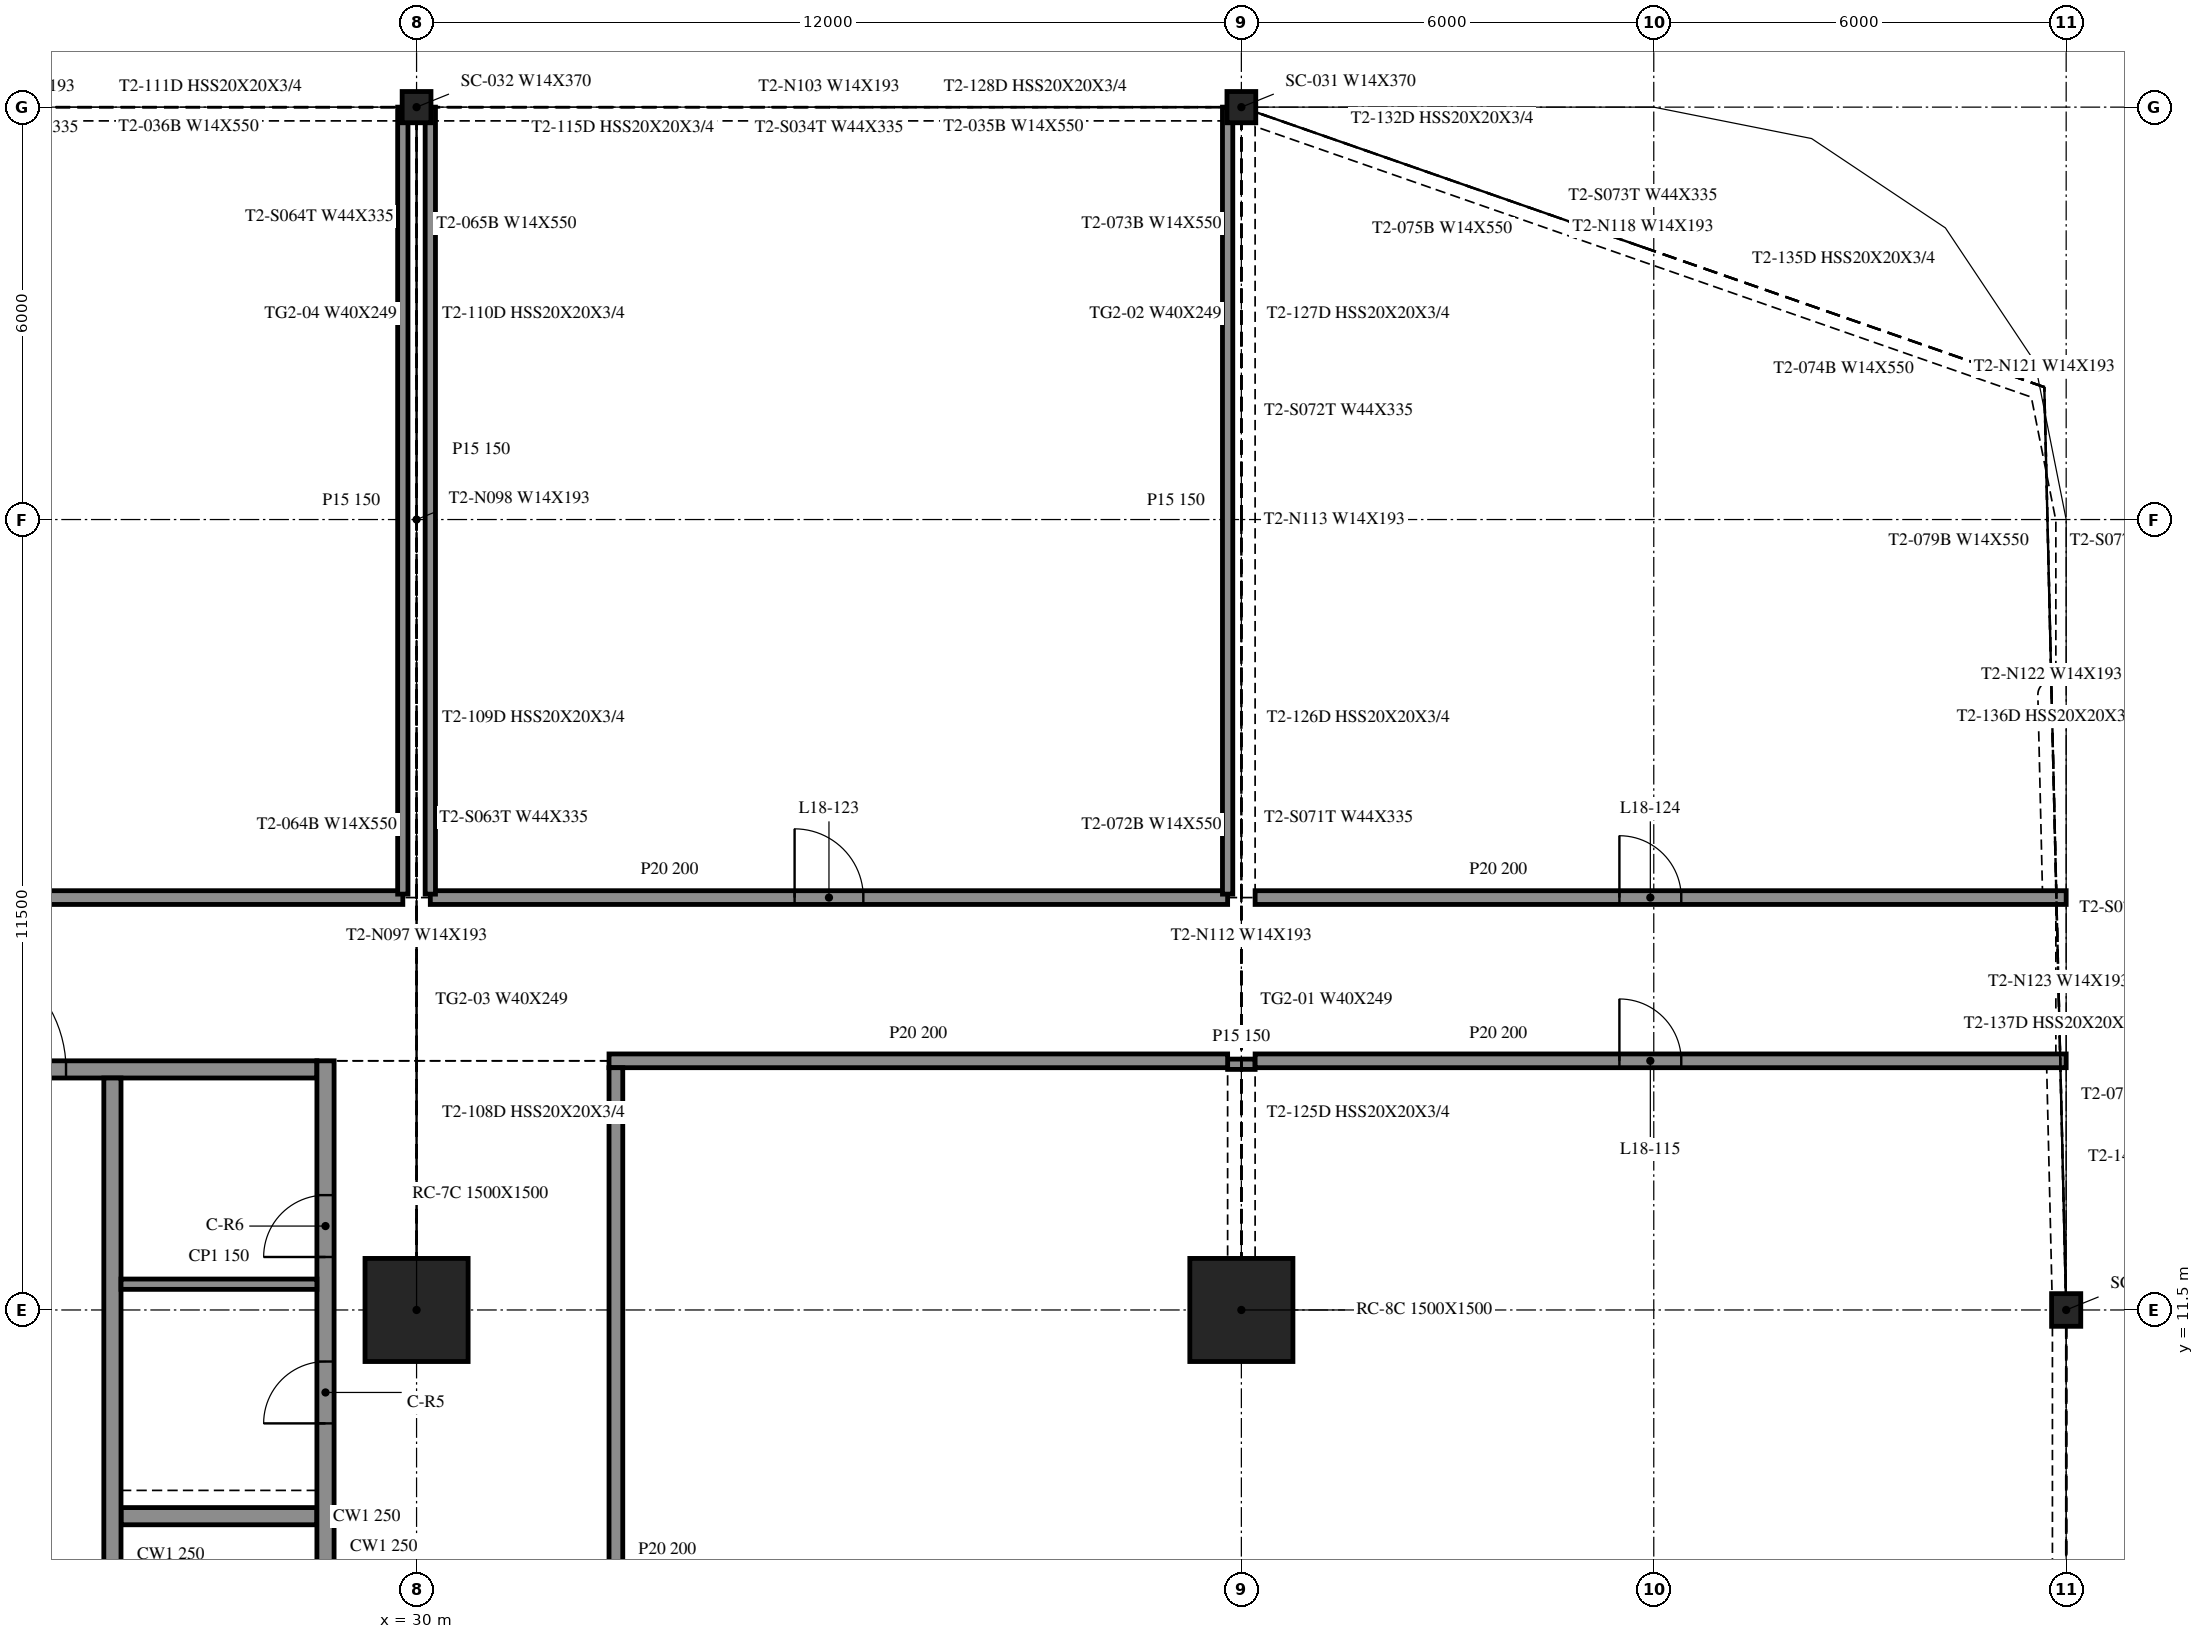
"""IFC4 building model, lengths in metres.
Left out: names, types, materials, properties, quantities, classifications, styles, units other than length and angle.
Written with IfcOpenShell. Run it as: python <this file> out.ifc"""

import sys

from ifc_helpers import new_model, si_unit, direction, frame, frame_2d, origin, origin_2d, place, context, subcontext, project, spatial, rectangle, i_section, extrude, element, fill, save


model = new_model("IFC4")
c1 = context("Model", 3, precision=1e-05, world=origin(), true_north=direction((0.0, 1.0)))
c2 = subcontext(c1, "Body", "Model", "MODEL_VIEW")
j1 = project(units=[si_unit("LENGTHUNIT", "METRE"), si_unit("PLANEANGLEUNIT", "RADIAN")], contexts=[c1])
p1 = place(None, origin())
s1 = spatial("IfcSite", under=j1, at=p1, CompositionType="ELEMENT")
p2 = place(p1, origin())
s2 = spatial("IfcBuilding", under=s1, at=p2, CompositionType="ELEMENT")
p3 = place(p2, frame((0.0, 0.0, 80.4)))
s3 = spatial("IfcBuildingStorey", under=s2, at=p3, CompositionType="ELEMENT", Elevation=80.4)
for number, where, z_axis, x_axis in (
    (1, (30.0, 11.5, -0.55), (0.0, 0.0, 1.0), (1.0, 0.0, 0.0)),
    (2, (42.0, 11.5, -0.55), (0.0, 0.0, 1.0), (1.0, 0.0, 0.0)),
):
    element("IfcColumn", number, at=place(p3, frame(where, z_axis=z_axis, x_axis=x_axis)), inside=s3, PredefinedType="COLUMN", context=c2, shape_type="SweptSolid", body=[
        extrude(rectangle(XDim=1.5, YDim=1.5, at=origin_2d()), origin(), (0.0, 0.0, 1.0), 4.61),
    ])
p4 = place(p3, frame((54.0, 11.5, -0.55), z_axis=(0.0, 0.0, 1.0), x_axis=(1.0, 0.0, 0.0)))
e3 = element("IfcColumn", 3, at=p4, inside=s3, PredefinedType="COLUMN", context=c2, shape_type="SweptSolid", body=[
    extrude(i_section(OverallWidth=0.424, OverallDepth=0.475, WebThickness=0.048, FlangeThickness=0.077, at=origin_2d()), origin(), (0.0, 0.0, 1.0), 4.61),
])
for number, where, z_axis, x_axis in (
    (4, (42.0, 29.0, -0.55), (0.0, 0.0, 1.0), (1.0, 0.0, 0.0)),
    (5, (30.0, 29.0, -0.55), (0.0, 0.0, 1.0), (1.0, 0.0, 0.0)),
):
    element("IfcColumn", number, at=place(p3, frame(where, z_axis=z_axis, x_axis=x_axis)), inside=s3, PredefinedType="COLUMN", context=c2, shape_type="SweptSolid", body=[
        extrude(i_section(OverallWidth=0.419, OverallDepth=0.455, WebThickness=0.042, FlangeThickness=0.068, at=origin_2d()), origin(), (0.0, 0.0, 1.0), 4.61),
    ])
p5 = place(p3, frame((28.675, -9.125, 0.0), z_axis=(0.0, 0.0, 1.0), x_axis=(0.0, 1.0, 0.0)))
e6 = element("IfcWall", 6, at=p5, inside=s3, PredefinedType="SOLIDWALL", context=c2, shape_type="SweptSolid", body=[
    extrude(rectangle(XDim=24.25, YDim=0.25, at=frame_2d((12.125, 0.0))), origin(), (0.0, 0.0, 1.0), 4.06),
])
p6 = place(p5, frame((14.425, 0.0, 0.0)))
e7 = element("IfcOpeningElement", 7, at=p6, cuts=e6, PredefinedType="OPENING", context=c2, shape_type="SweptSolid", body=[
    extrude(rectangle(XDim=0.9, YDim=2.1, at=frame_2d((0.45, 1.05))), frame((0.0, 0.135, 0.0), z_axis=(0.0, -1.0, 0.0), x_axis=(1.0, 0.0, 0.0)), (0.0, 0.0, 1.0), 0.27),
])
p7 = place(p5, frame((18.975, 0.0, 0.0)))
e8 = element("IfcOpeningElement", 8, at=p7, cuts=e6, PredefinedType="OPENING", context=c2, shape_type="SweptSolid", body=[
    extrude(rectangle(XDim=0.9, YDim=2.1, at=frame_2d((0.45, 1.05))), frame((0.0, 0.135, 0.0), z_axis=(0.0, -1.0, 0.0), x_axis=(1.0, 0.0, 0.0)), (0.0, 0.0, 1.0), 0.27),
])
p8 = place(p5, frame((21.396, 0.0, 0.0)))
e9 = element("IfcOpeningElement", 9, at=p8, cuts=e6, PredefinedType="OPENING", context=c2, shape_type="SweptSolid", body=[
    extrude(rectangle(XDim=0.9, YDim=2.1, at=frame_2d((0.45, 1.05))), frame((0.0, 0.135, 0.0), z_axis=(0.0, -1.0, 0.0), x_axis=(1.0, 0.0, 0.0)), (0.0, 0.0, 1.0), 0.27),
])
p9 = place(p3, frame((19.45, 15.0, 0.0), z_axis=(0.0, 0.0, 1.0), x_axis=(1.0, 0.0, 0.0)))
e10 = element("IfcWall", 10, at=p9, inside=s3, PredefinedType="SOLIDWALL", context=c2, shape_type="SweptSolid", body=[
    extrude(rectangle(XDim=9.1, YDim=0.25, at=frame_2d((4.55, 0.0))), origin(), (0.0, 0.0, 1.0), 4.06),
])
p10 = place(p9, frame((3.65, 0.0, 0.0)))
e11 = element("IfcOpeningElement", 11, at=p10, cuts=e10, PredefinedType="OPENING", context=c2, shape_type="SweptSolid", body=[
    extrude(rectangle(XDim=1.8, YDim=2.1, at=frame_2d((0.9, 1.05))), frame((0.0, 0.135, 0.0), z_axis=(0.0, -1.0, 0.0), x_axis=(1.0, 0.0, 0.0)), (0.0, 0.0, 1.0), 0.27),
])
p11 = place(p3, frame((25.575, 14.875, 0.0), z_axis=(0.0, 0.0, 1.0), x_axis=(0.0, -1.0, 0.0)))
e12 = element("IfcWall", 12, at=p11, inside=s3, PredefinedType="SOLIDWALL", context=c2, shape_type="SweptSolid", body=[
    extrude(rectangle(XDim=17.5, YDim=0.25, at=frame_2d((8.75, 0.0))), origin(), (0.0, 0.0, 1.0), 4.06),
])
p12 = place(p11, frame((15.45, 0.0, 0.0)))
e13 = element("IfcOpeningElement", 13, at=p12, cuts=e12, PredefinedType="OPENING", context=c2, shape_type="SweptSolid", body=[
    extrude(rectangle(XDim=1.1, YDim=2.1, at=frame_2d((0.55, 1.05))), frame((0.0, 0.135, 0.0), z_axis=(0.0, -1.0, 0.0), x_axis=(1.0, 0.0, 0.0)), (0.0, 0.0, 1.0), 0.27),
])
p13 = place(p11, frame((12.8, 0.0, 0.0)))
e14 = element("IfcOpeningElement", 14, at=p13, cuts=e12, PredefinedType="OPENING", context=c2, shape_type="SweptSolid", body=[
    extrude(rectangle(XDim=0.9, YDim=2.1, at=frame_2d((0.45, 1.05))), frame((0.0, 0.135, 0.0), z_axis=(0.0, -1.0, 0.0), x_axis=(1.0, 0.0, 0.0)), (0.0, 0.0, 1.0), 0.27),
])
p14 = place(p3, frame((25.7, 8.5, 0.0), z_axis=(0.0, 0.0, 1.0), x_axis=(1.0, 0.0, 0.0)))
e15 = element("IfcWall", 15, at=p14, inside=s3, PredefinedType="SOLIDWALL", context=c2, shape_type="SweptSolid", body=[
    extrude(rectangle(XDim=2.85, YDim=0.25, at=frame_2d((1.425, 0.0))), origin(), (0.0, 0.0, 1.0), 4.06),
])
p15 = place(p3, frame((25.7, 11.875, 0.0), z_axis=(0.0, 0.0, 1.0), x_axis=(1.0, 0.0, 0.0)))
e16 = element("IfcWall", 16, at=p15, inside=s3, PredefinedType="PARTITIONING", context=c2, shape_type="SweptSolid", body=[
    extrude(rectangle(XDim=2.85, YDim=0.15, at=frame_2d((1.425, 0.0))), origin(), (0.0, 0.0, 1.0), 4.06),
])
p16 = place(p3, frame((41.8, 15.075, 0.0), z_axis=(0.0, 0.0, 1.0), x_axis=(1.0, 0.0, 0.0)))
e17 = element("IfcWall", 17, at=p16, inside=s3, PredefinedType="PARTITIONING", context=c2, shape_type="SweptSolid", body=[
    extrude(rectangle(XDim=0.4, YDim=0.15, at=frame_2d((0.2, 0.0))), origin(), (0.0, 0.0, 1.0), 4.06),
])
p17 = place(p3, frame((32.8, 15.125, 0.0), z_axis=(0.0, 0.0, 1.0), x_axis=(1.0, 0.0, 0.0)))
e18 = element("IfcWall", 18, at=p17, inside=s3, PredefinedType="PARTITIONING", context=c2, shape_type="SweptSolid", body=[
    extrude(rectangle(XDim=9.0, YDim=0.2, at=frame_2d((4.5, 0.0))), origin(), (0.0, 0.0, 1.0), 4.06),
])
p18 = place(p3, frame((42.2, 15.125, 0.0), z_axis=(0.0, 0.0, 1.0), x_axis=(1.0, 0.0, 0.0)))
e19 = element("IfcWall", 19, at=p18, inside=s3, PredefinedType="PARTITIONING", context=c2, shape_type="SweptSolid", body=[
    extrude(rectangle(XDim=11.8, YDim=0.2, at=frame_2d((5.9, 0.0))), origin(), (0.0, 0.0, 1.0), 4.06),
])
p19 = place(p18, frame((5.3, 0.0, 0.0)))
e20 = element("IfcOpeningElement", 20, at=p19, cuts=e19, PredefinedType="OPENING", context=c2, shape_type="SweptSolid", body=[
    extrude(rectangle(XDim=0.9, YDim=2.1, at=frame_2d((0.45, 1.05))), frame((0.0, 0.11, 0.0), z_axis=(0.0, -1.0, 0.0), x_axis=(1.0, 0.0, 0.0)), (0.0, 0.0, 1.0), 0.22),
])
p20 = place(p3, frame((18.2, 17.5, 0.0), z_axis=(0.0, 0.0, 1.0), x_axis=(1.0, 0.0, 0.0)))
e21 = element("IfcWall", 21, at=p20, inside=s3, PredefinedType="PARTITIONING", context=c2, shape_type="SweptSolid", body=[
    extrude(rectangle(XDim=11.6, YDim=0.2, at=frame_2d((5.8, 0.0))), origin(), (0.0, 0.0, 1.0), 4.06),
])
p21 = place(p20, frame((5.1, 0.0, 0.0)))
e22 = element("IfcOpeningElement", 22, at=p21, cuts=e21, PredefinedType="OPENING", context=c2, shape_type="SweptSolid", body=[
    extrude(rectangle(XDim=1.2, YDim=2.1, at=frame_2d((0.6, 1.05))), frame((0.0, 0.11, 0.0), z_axis=(0.0, -1.0, 0.0), x_axis=(1.0, 0.0, 0.0)), (0.0, 0.0, 1.0), 0.22),
])
p22 = place(p3, frame((30.2, 17.5, 0.0), z_axis=(0.0, 0.0, 1.0), x_axis=(1.0, 0.0, 0.0)))
e23 = element("IfcWall", 23, at=p22, inside=s3, PredefinedType="PARTITIONING", context=c2, shape_type="SweptSolid", body=[
    extrude(rectangle(XDim=11.6, YDim=0.2, at=frame_2d((5.8, 0.0))), origin(), (0.0, 0.0, 1.0), 4.06),
])
p23 = place(p22, frame((5.3, 0.0, 0.0)))
e24 = element("IfcOpeningElement", 24, at=p23, cuts=e23, PredefinedType="OPENING", context=c2, shape_type="SweptSolid", body=[
    extrude(rectangle(XDim=1.0, YDim=2.1, at=frame_2d((0.5, 1.05))), frame((0.0, 0.11, 0.0), z_axis=(0.0, -1.0, 0.0), x_axis=(1.0, 0.0, 0.0)), (0.0, 0.0, 1.0), 0.22),
])
p24 = place(p3, frame((42.2, 17.5, 0.0), z_axis=(0.0, 0.0, 1.0), x_axis=(1.0, 0.0, 0.0)))
e25 = element("IfcWall", 25, at=p24, inside=s3, PredefinedType="PARTITIONING", context=c2, shape_type="SweptSolid", body=[
    extrude(rectangle(XDim=11.8, YDim=0.2, at=frame_2d((5.9, 0.0))), origin(), (0.0, 0.0, 1.0), 4.06),
])
p25 = place(p24, frame((5.3, 0.0, 0.0)))
e26 = element("IfcOpeningElement", 26, at=p25, cuts=e25, PredefinedType="OPENING", context=c2, shape_type="SweptSolid", body=[
    extrude(rectangle(XDim=0.9, YDim=2.1, at=frame_2d((0.45, 1.05))), frame((0.0, 0.11, 0.0), z_axis=(0.0, -1.0, 0.0), x_axis=(1.0, 0.0, 0.0)), (0.0, 0.0, 1.0), 0.22),
])
for number, where, z_axis, x_axis in (
    (27, (29.8, 17.55, 0.0), (0.0, 0.0, 1.0), (0.0, 1.0, 0.0)),
    (28, (30.2, 17.55, 0.0), (0.0, 0.0, 1.0), (0.0, 1.0, 0.0)),
):
    element("IfcWall", number, at=place(p3, frame(where, z_axis=z_axis, x_axis=x_axis)), inside=s3, PredefinedType="PARTITIONING", context=c2, shape_type="SweptSolid", body=[
        extrude(rectangle(XDim=11.45, YDim=0.15, at=frame_2d((5.725, 0.0))), origin(), (0.0, 0.0, 1.0), 4.06),
    ])
p26 = place(p3, frame((32.9, -9.025, 0.0), z_axis=(0.0, 0.0, 1.0), x_axis=(0.0, 1.0, 0.0)))
e29 = element("IfcWall", 29, at=p26, inside=s3, PredefinedType="PARTITIONING", context=c2, shape_type="SweptSolid", body=[
    extrude(rectangle(XDim=24.05, YDim=0.2, at=frame_2d((12.025, 0.0))), origin(), (0.0, 0.0, 1.0), 4.06),
])
p27 = place(p3, frame((41.8, 17.55, 0.0), z_axis=(0.0, 0.0, 1.0), x_axis=(0.0, 1.0, 0.0)))
e30 = element("IfcWall", 30, at=p27, inside=s3, PredefinedType="PARTITIONING", context=c2, shape_type="SweptSolid", body=[
    extrude(rectangle(XDim=11.45, YDim=0.15, at=frame_2d((5.725, 0.0))), origin(), (0.0, 0.0, 1.0), 4.06),
])
p28 = place(p10, origin())
e31 = element("IfcDoor", 31, at=p28, inside=s3, OperationType="DOUBLE_DOOR_SINGLE_SWING", PredefinedType="DOOR", context=c2, shape_type="SweptSolid", body=[
    extrude(rectangle(XDim=1.8, YDim=2.1, at=frame_2d((0.9, 1.05))), frame((0.0, 0.025, 0.0), z_axis=(0.0, -1.0, 0.0), x_axis=(1.0, 0.0, 0.0)), (0.0, 0.0, 1.0), 0.05),
])
fill(e11, e31)
p29 = place(p7, origin())
e32 = element("IfcDoor", 32, at=p29, inside=s3, OperationType="SINGLE_SWING_LEFT", PredefinedType="DOOR", context=c2, shape_type="SweptSolid", body=[
    extrude(rectangle(XDim=0.9, YDim=2.1, at=frame_2d((0.45, 1.05))), frame((0.0, 0.025, 0.0), z_axis=(0.0, -1.0, 0.0), x_axis=(1.0, 0.0, 0.0)), (0.0, 0.0, 1.0), 0.05),
])
fill(e8, e32)
p30 = place(p8, origin())
e33 = element("IfcDoor", 33, at=p30, inside=s3, OperationType="SINGLE_SWING_RIGHT", PredefinedType="DOOR", context=c2, shape_type="SweptSolid", body=[
    extrude(rectangle(XDim=0.9, YDim=2.1, at=frame_2d((0.45, 1.05))), frame((0.0, 0.025, 0.0), z_axis=(0.0, -1.0, 0.0), x_axis=(1.0, 0.0, 0.0)), (0.0, 0.0, 1.0), 0.05),
])
fill(e9, e33)
p31 = place(p19, origin())
e34 = element("IfcDoor", 34, at=p31, inside=s3, OperationType="SINGLE_SWING_RIGHT", PredefinedType="DOOR", context=c2, shape_type="SweptSolid", body=[
    extrude(rectangle(XDim=0.9, YDim=2.1, at=frame_2d((0.45, 1.05))), frame((0.0, 0.025, 0.0), z_axis=(0.0, -1.0, 0.0), x_axis=(1.0, 0.0, 0.0)), (0.0, 0.0, 1.0), 0.05),
])
fill(e20, e34)
p32 = place(p23, origin())
e35 = element("IfcDoor", 35, at=p32, inside=s3, OperationType="SINGLE_SWING_RIGHT", PredefinedType="DOOR", context=c2, shape_type="SweptSolid", body=[
    extrude(rectangle(XDim=1.0, YDim=2.1, at=frame_2d((0.5, 1.05))), frame((0.0, 0.025, 0.0), z_axis=(0.0, -1.0, 0.0), x_axis=(1.0, 0.0, 0.0)), (0.0, 0.0, 1.0), 0.05),
])
fill(e24, e35)
p33 = place(p25, origin())
e36 = element("IfcDoor", 36, at=p33, inside=s3, OperationType="SINGLE_SWING_RIGHT", PredefinedType="DOOR", context=c2, shape_type="SweptSolid", body=[
    extrude(rectangle(XDim=0.9, YDim=2.1, at=frame_2d((0.45, 1.05))), frame((0.0, 0.025, 0.0), z_axis=(0.0, -1.0, 0.0), x_axis=(1.0, 0.0, 0.0)), (0.0, 0.0, 1.0), 0.05),
])
fill(e26, e36)
save(model, sys.argv[1])
